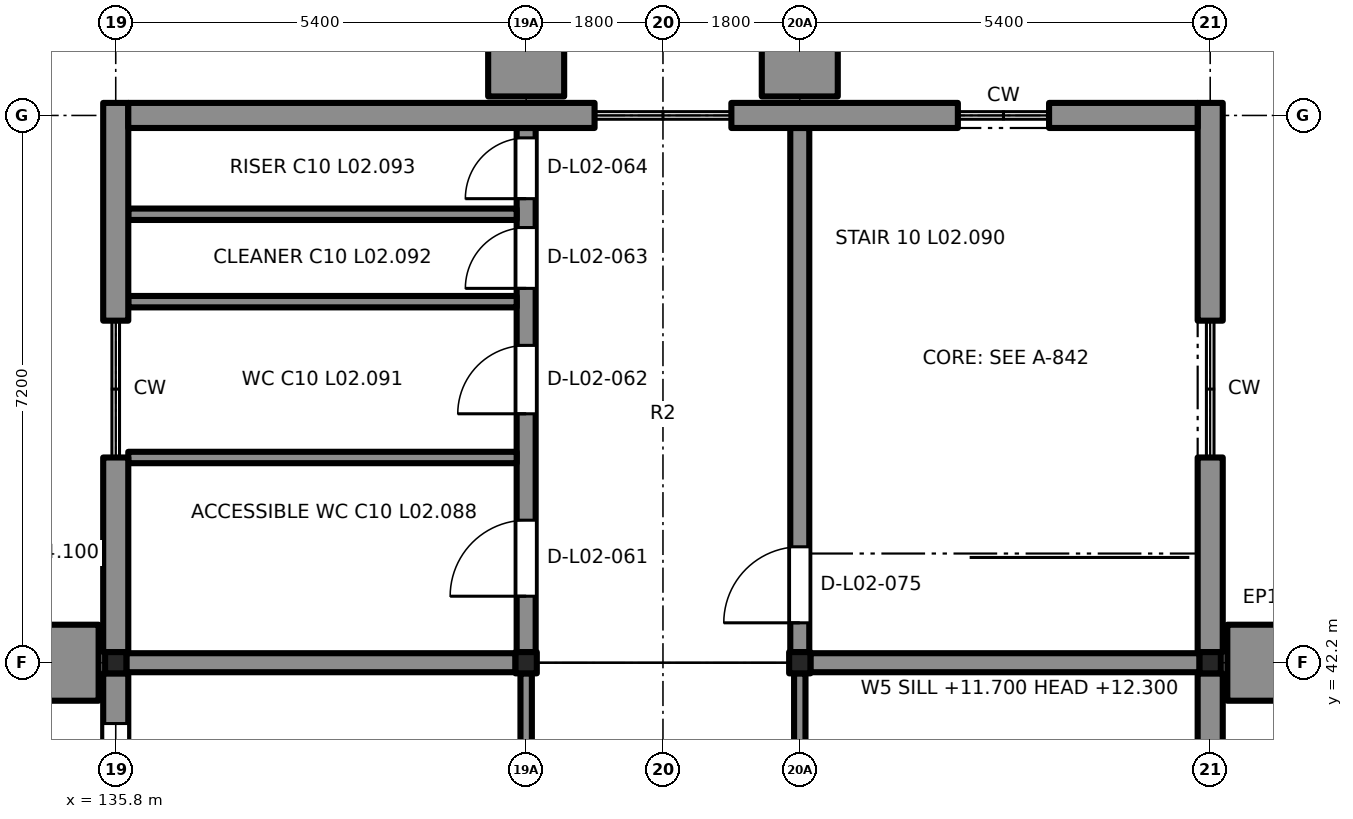
"""IFC4 building model, lengths in metres.
Left out: names, types, materials, properties, quantities, classifications, styles, units other than length and angle.
Written with IfcOpenShell. Run it as: python <this file> out.ifc"""

import sys

from ifc_helpers import new_model, si_unit, direction, frame, frame_2d, origin, origin_2d, place, context, subcontext, project, spatial, rectangle, extrude, element, fill, save


model = new_model("IFC4")
c1 = context("Model", 3, precision=1e-05, world=origin(), true_north=direction((0.0, 1.0)))
c2 = subcontext(c1, "Body", "Model", "MODEL_VIEW")
j1 = project(units=[si_unit("LENGTHUNIT", "METRE"), si_unit("PLANEANGLEUNIT", "RADIAN")], contexts=[c1])
p1 = place(None, origin())
s1 = spatial("IfcSite", under=j1, at=p1, CompositionType="ELEMENT")
p2 = place(p1, origin())
s2 = spatial("IfcBuilding", under=s1, at=p2, CompositionType="ELEMENT")
p3 = place(p2, frame((0.0, 0.0, 10.2)))
s3 = spatial("IfcBuildingStorey", under=s2, at=p3, CompositionType="ELEMENT", Elevation=10.2)
for number, where, z_axis, x_axis in (
    (1, (135.8, 42.2, 0.0), (0.0, 0.0, 1.0), (1.0, 0.0, 0.0)),
    (2, (141.2, 42.2, 0.0), (0.0, 0.0, 1.0), (1.0, 0.0, 0.0)),
    (3, (144.8, 42.2, 0.0), (0.0, 0.0, 1.0), (1.0, 0.0, 0.0)),
    (4, (150.2, 42.2, 0.0), (0.0, 0.0, 1.0), (1.0, 0.0, 0.0)),
):
    element("IfcColumn", number, at=place(p3, frame(where, z_axis=z_axis, x_axis=x_axis)), inside=s3, PredefinedType="COLUMN", context=c2, shape_type="SweptSolid", body=[
        extrude(rectangle(XDim=0.28, YDim=0.28, at=origin_2d()), origin(), (0.0, 0.0, 1.0), 3.9),
    ])
p4 = place(p3, frame((144.8, 42.34, 0.0), z_axis=(0.0, 0.0, 1.0), x_axis=(0.0, 1.0, 0.0)))
e5 = element("IfcWall", 5, at=p4, inside=s3, PredefinedType="SHEAR", context=c2, shape_type="SweptSolid", body=[
    extrude(rectangle(XDim=6.895, YDim=0.25, at=frame_2d((3.448, 0.0))), origin(), (0.0, 0.0, 1.0), 3.2),
])
p5 = place(p4, frame((0.385, 0.0, 0.0)))
e6 = element("IfcOpeningElement", 6, at=p5, cuts=e5, PredefinedType="OPENING", context=c2, shape_type="SweptSolid", body=[
    extrude(rectangle(XDim=1.0, YDim=2.1, at=frame_2d((0.5, 1.05))), frame((0.0, 0.135, 0.0), z_axis=(0.0, -1.0, 0.0), x_axis=(1.0, 0.0, 0.0)), (0.0, 0.0, 1.0), 0.27),
])
p6 = place(p3, frame((144.94, 42.2, 0.0), z_axis=(0.0, 0.0, 1.0), x_axis=(1.0, 0.0, 0.0)))
e7 = element("IfcWall", 7, at=p6, inside=s3, PredefinedType="SHEAR", context=c2, shape_type="SweptSolid", body=[
    extrude(rectangle(XDim=5.12, YDim=0.25, at=frame_2d((2.56, 0.0))), origin(), (0.0, 0.0, 1.0), 3.2),
])
p7 = place(p3, frame((141.2, 42.34, 0.0), z_axis=(0.0, 0.0, 1.0), x_axis=(0.0, 1.0, 0.0)))
e8 = element("IfcWall", 8, at=p7, inside=s3, PredefinedType="SHEAR", context=c2, shape_type="SweptSolid", body=[
    extrude(rectangle(XDim=6.895, YDim=0.25, at=frame_2d((3.448, 0.0))), origin(), (0.0, 0.0, 1.0), 3.2),
])
p8 = place(p7, frame((0.735, 0.0, 0.0)))
e9 = element("IfcOpeningElement", 9, at=p8, cuts=e8, PredefinedType="OPENING", context=c2, shape_type="SweptSolid", body=[
    extrude(rectangle(XDim=1.0, YDim=2.1, at=frame_2d((0.5, 1.05))), frame((0.0, 0.135, 0.0), z_axis=(0.0, -1.0, 0.0), x_axis=(1.0, 0.0, 0.0)), (0.0, 0.0, 1.0), 0.27),
])
p9 = place(p7, frame((3.135, 0.0, 0.0)))
e10 = element("IfcOpeningElement", 10, at=p9, cuts=e8, PredefinedType="OPENING", context=c2, shape_type="SweptSolid", body=[
    extrude(rectangle(XDim=0.9, YDim=2.1, at=frame_2d((0.45, 1.05))), frame((0.0, 0.135, 0.0), z_axis=(0.0, -1.0, 0.0), x_axis=(1.0, 0.0, 0.0)), (0.0, 0.0, 1.0), 0.27),
])
p10 = place(p7, frame((4.785, 0.0, 0.0)))
e11 = element("IfcOpeningElement", 11, at=p10, cuts=e8, PredefinedType="OPENING", context=c2, shape_type="SweptSolid", body=[
    extrude(rectangle(XDim=0.8, YDim=2.1, at=frame_2d((0.4, 1.05))), frame((0.0, 0.135, 0.0), z_axis=(0.0, -1.0, 0.0), x_axis=(1.0, 0.0, 0.0)), (0.0, 0.0, 1.0), 0.27),
])
p11 = place(p7, frame((5.965, 0.0, 0.0)))
e12 = element("IfcOpeningElement", 12, at=p11, cuts=e8, PredefinedType="OPENING", context=c2, shape_type="SweptSolid", body=[
    extrude(rectangle(XDim=0.8, YDim=2.1, at=frame_2d((0.4, 1.05))), frame((0.0, 0.135, 0.0), z_axis=(0.0, -1.0, 0.0), x_axis=(1.0, 0.0, 0.0)), (0.0, 0.0, 1.0), 0.27),
])
p12 = place(p3, frame((135.94, 42.2, 0.0), z_axis=(0.0, 0.0, 1.0), x_axis=(1.0, 0.0, 0.0)))
e13 = element("IfcWall", 13, at=p12, inside=s3, PredefinedType="SHEAR", context=c2, shape_type="SweptSolid", body=[
    extrude(rectangle(XDim=5.12, YDim=0.25, at=frame_2d((2.56, 0.0))), origin(), (0.0, 0.0, 1.0), 3.2),
])
for number, where, z_axis, x_axis in (
    (14, (135.965, 44.9, 0.0), (0.0, 0.0, 1.0), (1.0, 0.0, 0.0)),
    (15, (135.965, 46.95, 0.0), (0.0, 0.0, 1.0), (1.0, 0.0, 0.0)),
    (16, (135.965, 48.1, 0.0), (0.0, 0.0, 1.0), (1.0, 0.0, 0.0)),
):
    element("IfcWall", number, at=place(p3, frame(where, z_axis=z_axis, x_axis=x_axis)), inside=s3, PredefinedType="PARTITIONING", context=c2, shape_type="SweptSolid", body=[
        extrude(rectangle(XDim=5.11, YDim=0.15, at=frame_2d((2.555, 0.0))), origin(), (0.0, 0.0, 1.0), 3.2),
    ])
p13 = place(p3, frame((135.8, 35.14, 0.0), z_axis=(0.0, 0.0, 1.0), x_axis=(0.0, 1.0, 0.0)))
e17 = element("IfcWall", 17, at=p13, inside=s3, PredefinedType="SOLIDWALL", context=c2, shape_type="SweptSolid", body=[
    extrude(rectangle(XDim=6.92, YDim=0.33, at=frame_2d((3.46, 0.0))), origin(), (0.0, 0.0, 1.0), 3.2),
])
p14 = place(p13, frame((0.66, 0.0, 0.6)))
e18 = element("IfcOpeningElement", 18, at=p14, cuts=e17, PredefinedType="OPENING", context=c2, shape_type="SweptSolid", body=[
    extrude(rectangle(XDim=0.9, YDim=2.4, at=frame_2d((0.45, 1.2))), frame((0.0, 0.175, 0.0), z_axis=(0.0, -1.0, 0.0), x_axis=(1.0, 0.0, 0.0)), (0.0, 0.0, 1.0), 0.35),
])
p15 = place(p13, frame((1.76, 0.0, 0.6)))
e19 = element("IfcOpeningElement", 19, at=p15, cuts=e17, PredefinedType="OPENING", context=c2, shape_type="SweptSolid", body=[
    extrude(rectangle(XDim=0.9, YDim=2.4, at=frame_2d((0.45, 1.2))), frame((0.0, 0.175, 0.0), z_axis=(0.0, -1.0, 0.0), x_axis=(1.0, 0.0, 0.0)), (0.0, 0.0, 1.0), 0.35),
])
p16 = place(p13, frame((4.26, 0.0, 0.6)))
e20 = element("IfcOpeningElement", 20, at=p16, cuts=e17, PredefinedType="OPENING", context=c2, shape_type="SweptSolid", body=[
    extrude(rectangle(XDim=0.9, YDim=2.4, at=frame_2d((0.45, 1.2))), frame((0.0, 0.175, 0.0), z_axis=(0.0, -1.0, 0.0), x_axis=(1.0, 0.0, 0.0)), (0.0, 0.0, 1.0), 0.35),
])
p17 = place(p13, frame((5.36, 0.0, 0.6)))
e21 = element("IfcOpeningElement", 21, at=p17, cuts=e17, PredefinedType="OPENING", context=c2, shape_type="SweptSolid", body=[
    extrude(rectangle(XDim=0.9, YDim=2.4, at=frame_2d((0.45, 1.2))), frame((0.0, 0.175, 0.0), z_axis=(0.0, -1.0, 0.0), x_axis=(1.0, 0.0, 0.0)), (0.0, 0.0, 1.0), 0.35),
])
p18 = place(p3, frame((135.8, 42.34, 0.0), z_axis=(0.0, 0.0, 1.0), x_axis=(0.0, 1.0, 0.0)))
e22 = element("IfcWall", 22, at=p18, inside=s3, PredefinedType="SOLIDWALL", context=c2, shape_type="SweptSolid", body=[
    extrude(rectangle(XDim=2.56, YDim=0.33, at=frame_2d((1.28, 0.0))), origin(), (0.0, 0.0, 1.0), 3.2),
])
p19 = place(p3, frame((135.8, 46.7, 0.0), z_axis=(0.0, 0.0, 1.0), x_axis=(0.0, 1.0, 0.0)))
e23 = element("IfcWall", 23, at=p19, inside=s3, PredefinedType="SOLIDWALL", context=c2, shape_type="SweptSolid", body=[
    extrude(rectangle(XDim=2.865, YDim=0.33, at=frame_2d((1.433, 0.0))), origin(), (0.0, 0.0, 1.0), 3.2),
])
p20 = place(p3, frame((135.2, 41.7, 0.0), z_axis=(0.0, 0.0, 1.0), x_axis=(0.0, 1.0, 0.0)))
e24 = element("IfcWall", 24, at=p20, inside=s3, PredefinedType="SOLIDWALL", context=c2, shape_type="SweptSolid", body=[
    extrude(rectangle(XDim=1.0, YDim=0.75, at=frame_2d((0.5, 0.0))), origin(), (0.0, 0.0, 1.0), 3.9),
])
p21 = place(p3, frame((150.2, 42.06, 0.0), z_axis=(0.0, 0.0, 1.0), x_axis=(0.0, -1.0, 0.0)))
e25 = element("IfcWall", 25, at=p21, inside=s3, PredefinedType="SOLIDWALL", context=c2, shape_type="SweptSolid", body=[
    extrude(rectangle(XDim=6.92, YDim=0.33, at=frame_2d((3.46, 0.0))), origin(), (0.0, 0.0, 1.0), 3.2),
])
p22 = place(p21, frame((4.96, 0.0, 1.5)))
e26 = element("IfcOpeningElement", 26, at=p22, cuts=e25, PredefinedType="OPENING", context=c2, shape_type="SweptSolid", body=[
    extrude(rectangle(XDim=0.6, YDim=0.6, at=frame_2d((0.3, 0.3))), frame((0.0, 0.175, 0.0), z_axis=(0.0, -1.0, 0.0), x_axis=(1.0, 0.0, 0.0)), (0.0, 0.0, 1.0), 0.35),
])
p23 = place(p21, frame((1.36, 0.0, 1.5)))
e27 = element("IfcOpeningElement", 27, at=p23, cuts=e25, PredefinedType="OPENING", context=c2, shape_type="SweptSolid", body=[
    extrude(rectangle(XDim=0.6, YDim=0.6, at=frame_2d((0.3, 0.3))), frame((0.0, 0.175, 0.0), z_axis=(0.0, -1.0, 0.0), x_axis=(1.0, 0.0, 0.0)), (0.0, 0.0, 1.0), 0.35),
])
p24 = place(p3, frame((150.2, 44.9, 0.0), z_axis=(0.0, 0.0, 1.0), x_axis=(0.0, -1.0, 0.0)))
e28 = element("IfcWall", 28, at=p24, inside=s3, PredefinedType="SOLIDWALL", context=c2, shape_type="SweptSolid", body=[
    extrude(rectangle(XDim=2.56, YDim=0.33, at=frame_2d((1.28, 0.0))), origin(), (0.0, 0.0, 1.0), 3.2),
])
p25 = place(p3, frame((150.2, 49.565, 0.0), z_axis=(0.0, 0.0, 1.0), x_axis=(0.0, -1.0, 0.0)))
e29 = element("IfcWall", 29, at=p25, inside=s3, PredefinedType="SOLIDWALL", context=c2, shape_type="SweptSolid", body=[
    extrude(rectangle(XDim=2.865, YDim=0.33, at=frame_2d((1.433, 0.0))), origin(), (0.0, 0.0, 1.0), 3.2),
])
p26 = place(p3, frame((150.8, 42.7, 0.0), z_axis=(0.0, 0.0, 1.0), x_axis=(0.0, -1.0, 0.0)))
e30 = element("IfcWall", 30, at=p26, inside=s3, PredefinedType="SOLIDWALL", context=c2, shape_type="SweptSolid", body=[
    extrude(rectangle(XDim=1.0, YDim=0.75, at=frame_2d((0.5, 0.0))), origin(), (0.0, 0.0, 1.0), 3.9),
])
p27 = place(p3, frame((135.965, 49.4, 0.0), z_axis=(0.0, 0.0, 1.0), x_axis=(1.0, 0.0, 0.0)))
e31 = element("IfcWall", 31, at=p27, inside=s3, PredefinedType="SOLIDWALL", context=c2, shape_type="SweptSolid", body=[
    extrude(rectangle(XDim=6.135, YDim=0.33, at=frame_2d((3.067, 0.0))), origin(), (0.0, 0.0, 1.0), 3.2),
])
p28 = place(p3, frame((143.9, 49.4, 0.0), z_axis=(0.0, 0.0, 1.0), x_axis=(1.0, 0.0, 0.0)))
e32 = element("IfcWall", 32, at=p28, inside=s3, PredefinedType="SOLIDWALL", context=c2, shape_type="SweptSolid", body=[
    extrude(rectangle(XDim=2.98, YDim=0.33, at=frame_2d((1.49, 0.0))), origin(), (0.0, 0.0, 1.0), 3.2),
])
p29 = place(p3, frame((148.08, 49.4, 0.0), z_axis=(0.0, 0.0, 1.0), x_axis=(1.0, 0.0, 0.0)))
e33 = element("IfcWall", 33, at=p29, inside=s3, PredefinedType="SOLIDWALL", context=c2, shape_type="SweptSolid", body=[
    extrude(rectangle(XDim=1.955, YDim=0.33, at=frame_2d((0.978, 0.0))), origin(), (0.0, 0.0, 1.0), 3.2),
])
for number, where, z_axis, x_axis in (
    (34, (140.7, 50.025, 0.0), (0.0, 0.0, 1.0), (1.0, 0.0, 0.0)),
    (35, (144.3, 50.025, 0.0), (0.0, 0.0, 1.0), (1.0, 0.0, 0.0)),
):
    element("IfcWall", number, at=place(p3, frame(where, z_axis=z_axis, x_axis=x_axis)), inside=s3, PredefinedType="SOLIDWALL", context=c2, shape_type="SweptSolid", body=[
        extrude(rectangle(XDim=1.0, YDim=0.75, at=frame_2d((0.5, 0.0))), origin(), (0.0, 0.0, 1.0), 3.9),
    ])
p30 = place(p3, frame((135.965, 49.4, 3.6), z_axis=(0.0, 0.0, 1.0), x_axis=(1.0, 0.0, 0.0)))
e36 = element("IfcWall", 36, at=p30, inside=s3, PredefinedType="SOLIDWALL", context=c2, shape_type="SweptSolid", body=[
    extrude(rectangle(XDim=1.335, YDim=0.33, at=frame_2d((0.667, 0.0))), origin(), (0.0, 0.0, 1.0), 3.4),
])
p31 = place(p3, frame((137.3, 49.4, 3.6), z_axis=(0.0, 0.0, 1.0), x_axis=(1.0, 0.0, 0.0)))
e37 = element("IfcWall", 37, at=p31, inside=s3, PredefinedType="SOLIDWALL", context=c2, shape_type="SweptSolid", body=[
    extrude(rectangle(XDim=1.5, YDim=0.33, at=frame_2d((0.75, 0.0))), origin(), (0.0, 0.0, 1.0), 4.4),
])
p32 = place(p3, frame((138.8, 49.4, 3.6), z_axis=(0.0, 0.0, 1.0), x_axis=(1.0, 0.0, 0.0)))
e38 = element("IfcWall", 38, at=p32, inside=s3, PredefinedType="SOLIDWALL", context=c2, shape_type="SweptSolid", body=[
    extrude(rectangle(XDim=1.5, YDim=0.33, at=frame_2d((0.75, 0.0))), origin(), (0.0, 0.0, 1.0), 5.4),
])
p33 = place(p3, frame((140.3, 49.4, 3.6), z_axis=(0.0, 0.0, 1.0), x_axis=(1.0, 0.0, 0.0)))
e39 = element("IfcWall", 39, at=p33, inside=s3, PredefinedType="SOLIDWALL", context=c2, shape_type="SweptSolid", body=[
    extrude(rectangle(XDim=1.5, YDim=0.33, at=frame_2d((0.75, 0.0))), origin(), (0.0, 0.0, 1.0), 6.45),
])
p34 = place(p3, frame((141.8, 49.4, 3.6), z_axis=(0.0, 0.0, 1.0), x_axis=(1.0, 0.0, 0.0)))
e40 = element("IfcWall", 40, at=p34, inside=s3, PredefinedType="SOLIDWALL", context=c2, shape_type="SweptSolid", body=[
    extrude(rectangle(XDim=2.4, YDim=0.33, at=frame_2d((1.2, 0.0))), origin(), (0.0, 0.0, 1.0), 7.25),
])
p35 = place(p3, frame((144.2, 49.4, 3.6), z_axis=(0.0, 0.0, 1.0), x_axis=(1.0, 0.0, 0.0)))
e41 = element("IfcWall", 41, at=p35, inside=s3, PredefinedType="SOLIDWALL", context=c2, shape_type="SweptSolid", body=[
    extrude(rectangle(XDim=1.5, YDim=0.33, at=frame_2d((0.75, 0.0))), origin(), (0.0, 0.0, 1.0), 6.45),
])
p36 = place(p3, frame((145.7, 49.4, 3.6), z_axis=(0.0, 0.0, 1.0), x_axis=(1.0, 0.0, 0.0)))
e42 = element("IfcWall", 42, at=p36, inside=s3, PredefinedType="SOLIDWALL", context=c2, shape_type="SweptSolid", body=[
    extrude(rectangle(XDim=1.5, YDim=0.33, at=frame_2d((0.75, 0.0))), origin(), (0.0, 0.0, 1.0), 5.4),
])
p37 = place(p3, frame((147.2, 49.4, 3.6), z_axis=(0.0, 0.0, 1.0), x_axis=(1.0, 0.0, 0.0)))
e43 = element("IfcWall", 43, at=p37, inside=s3, PredefinedType="SOLIDWALL", context=c2, shape_type="SweptSolid", body=[
    extrude(rectangle(XDim=1.5, YDim=0.33, at=frame_2d((0.75, 0.0))), origin(), (0.0, 0.0, 1.0), 4.4),
])
p38 = place(p3, frame((148.7, 49.4, 3.6), z_axis=(0.0, 0.0, 1.0), x_axis=(1.0, 0.0, 0.0)))
e44 = element("IfcWall", 44, at=p38, inside=s3, PredefinedType="SOLIDWALL", context=c2, shape_type="SweptSolid", body=[
    extrude(rectangle(XDim=1.335, YDim=0.33, at=frame_2d((0.667, 0.0))), origin(), (0.0, 0.0, 1.0), 3.4),
])
p39 = place(p3, frame((141.2, 35.14, 0.0), z_axis=(0.0, 0.0, 1.0), x_axis=(0.0, 1.0, 0.0)))
e45 = element("IfcWall", 45, at=p39, inside=s3, PredefinedType="PARTITIONING", context=c2, shape_type="SweptSolid", body=[
    extrude(rectangle(XDim=6.92, YDim=0.15, at=frame_2d((3.46, 0.0))), origin(), (0.0, 0.0, 1.0), 4.467),
])
p40 = place(p39, frame((0.91, 0.0, 0.0)))
e46 = element("IfcOpeningElement", 46, at=p40, cuts=e45, PredefinedType="OPENING", context=c2, shape_type="SweptSolid", body=[
    extrude(rectangle(XDim=1.5, YDim=2.1, at=frame_2d((0.75, 1.05))), frame((0.0, 0.085, 0.0), z_axis=(0.0, -1.0, 0.0), x_axis=(1.0, 0.0, 0.0)), (0.0, 0.0, 1.0), 0.17),
])
p41 = place(p3, frame((144.8, 38.6, 0.0), z_axis=(0.0, 0.0, 1.0), x_axis=(0.0, 1.0, 0.0)))
e47 = element("IfcWall", 47, at=p41, inside=s3, PredefinedType="PARTITIONING", context=c2, shape_type="SweptSolid", body=[
    extrude(rectangle(XDim=3.46, YDim=0.15, at=frame_2d((1.73, 0.0))), origin(), (0.0, 0.0, 1.0), 4.467),
])
p42 = place(p41, frame((1.35, 0.0, 0.0)))
e48 = element("IfcOpeningElement", 48, at=p42, cuts=e47, PredefinedType="OPENING", context=c2, shape_type="SweptSolid", body=[
    extrude(rectangle(XDim=0.9, YDim=2.1, at=frame_2d((0.45, 1.05))), frame((0.0, 0.085, 0.0), z_axis=(0.0, -1.0, 0.0), x_axis=(1.0, 0.0, 0.0)), (0.0, 0.0, 1.0), 0.17),
])
p43 = place(p5, origin())
e49 = element("IfcDoor", 49, at=p43, inside=s3, OperationType="SINGLE_SWING_RIGHT", PredefinedType="DOOR", context=c2, shape_type="SweptSolid", body=[
    extrude(rectangle(XDim=1.0, YDim=2.1, at=frame_2d((0.5, 1.05))), frame((0.0, 0.025, 0.0), z_axis=(0.0, -1.0, 0.0), x_axis=(1.0, 0.0, 0.0)), (0.0, 0.0, 1.0), 0.05),
])
fill(e6, e49)
p44 = place(p8, origin())
e50 = element("IfcDoor", 50, at=p44, inside=s3, OperationType="SINGLE_SWING_LEFT", PredefinedType="DOOR", context=c2, shape_type="SweptSolid", body=[
    extrude(rectangle(XDim=1.0, YDim=2.1, at=frame_2d((0.5, 1.05))), frame((0.0, 0.025, 0.0), z_axis=(0.0, -1.0, 0.0), x_axis=(1.0, 0.0, 0.0)), (0.0, 0.0, 1.0), 0.05),
])
fill(e9, e50)
p45 = place(p9, origin())
e51 = element("IfcDoor", 51, at=p45, inside=s3, OperationType="SINGLE_SWING_LEFT", PredefinedType="DOOR", context=c2, shape_type="SweptSolid", body=[
    extrude(rectangle(XDim=0.9, YDim=2.1, at=frame_2d((0.45, 1.05))), frame((0.0, 0.025, 0.0), z_axis=(0.0, -1.0, 0.0), x_axis=(1.0, 0.0, 0.0)), (0.0, 0.0, 1.0), 0.05),
])
fill(e10, e51)
p46 = place(p10, origin())
e52 = element("IfcDoor", 52, at=p46, inside=s3, OperationType="SINGLE_SWING_LEFT", PredefinedType="DOOR", context=c2, shape_type="SweptSolid", body=[
    extrude(rectangle(XDim=0.8, YDim=2.1, at=frame_2d((0.4, 1.05))), frame((0.0, 0.025, 0.0), z_axis=(0.0, -1.0, 0.0), x_axis=(1.0, 0.0, 0.0)), (0.0, 0.0, 1.0), 0.05),
])
fill(e11, e52)
p47 = place(p11, origin())
e53 = element("IfcDoor", 53, at=p47, inside=s3, OperationType="SINGLE_SWING_LEFT", PredefinedType="DOOR", context=c2, shape_type="SweptSolid", body=[
    extrude(rectangle(XDim=0.8, YDim=2.1, at=frame_2d((0.4, 1.05))), frame((0.0, 0.025, 0.0), z_axis=(0.0, -1.0, 0.0), x_axis=(1.0, 0.0, 0.0)), (0.0, 0.0, 1.0), 0.05),
])
fill(e12, e53)
p48 = place(p17, origin())
e54 = element("IfcWindow", 54, at=p48, inside=s3, PartitioningType="SINGLE_PANEL", PredefinedType="WINDOW", context=c2, shape_type="SweptSolid", body=[
    extrude(rectangle(XDim=0.9, YDim=2.4, at=frame_2d((0.45, 1.2))), frame((0.0, -0.03, 0.0), z_axis=(0.0, -1.0, 0.0), x_axis=(1.0, 0.0, 0.0)), (0.0, 0.0, 1.0), 0.06),
])
fill(e21, e54)
save(model, sys.argv[1])
